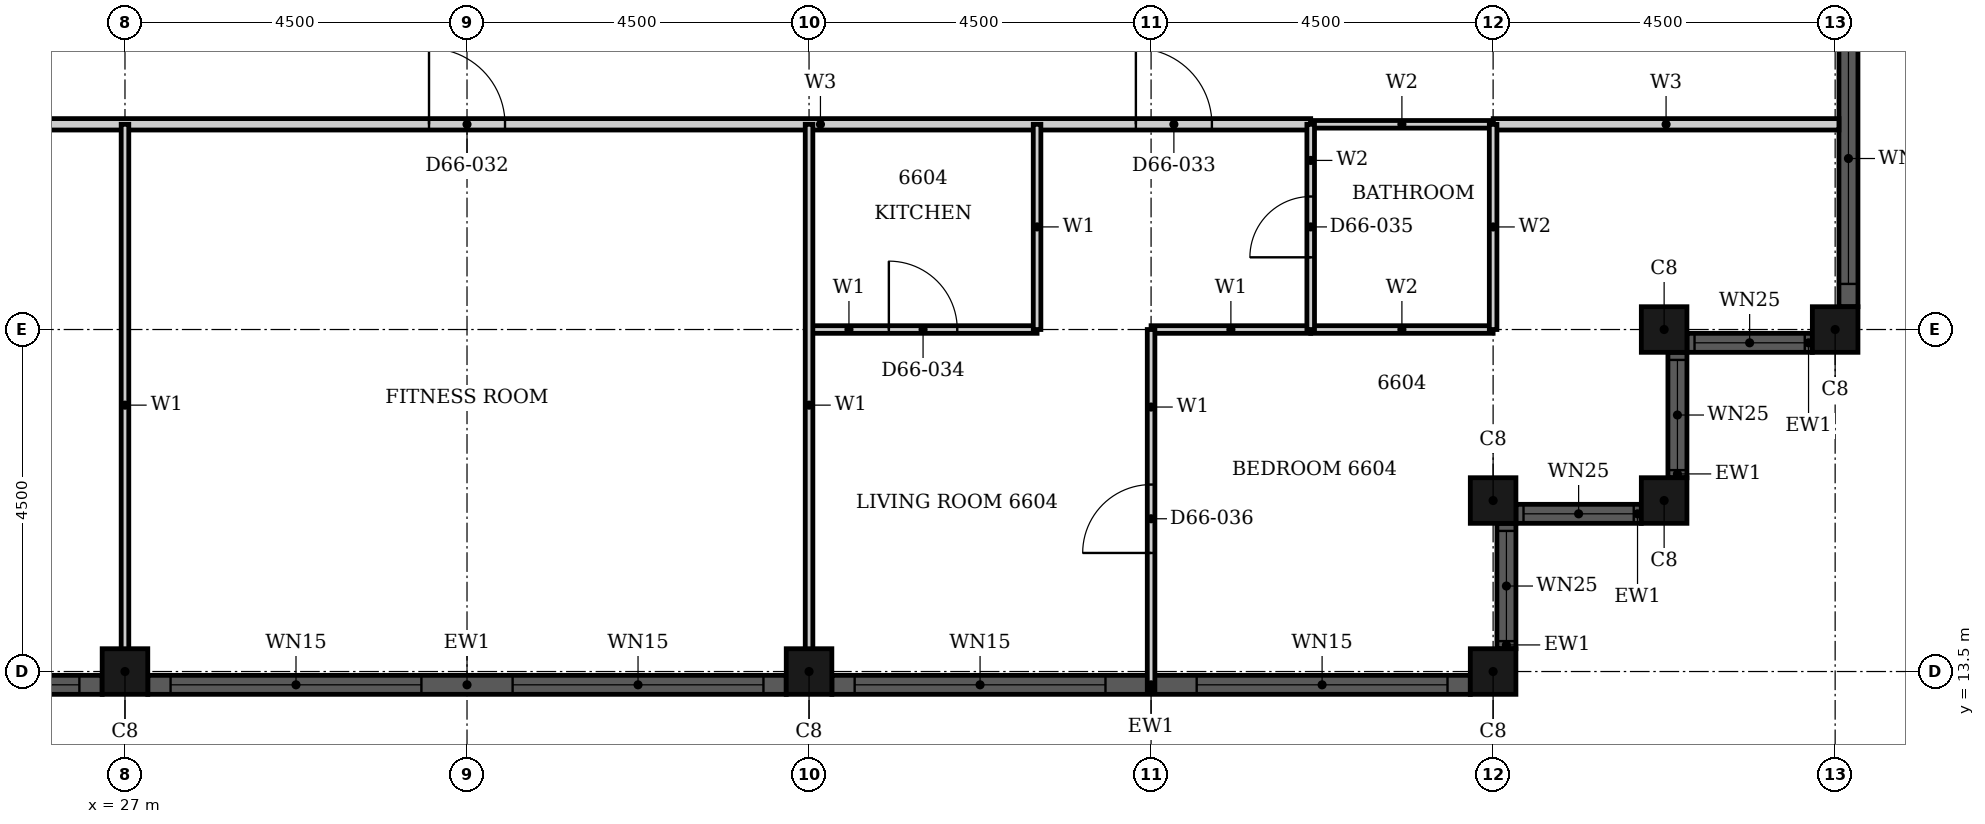
"""IFC4 building model, lengths in metres.
Left out: names, types, materials, properties, quantities, classifications, styles, units other than length and angle.
Written with IfcOpenShell. Run it as: python <this file> out.ifc"""

import sys

from ifc_helpers import new_model, si_unit, direction, frame, frame_2d, origin, origin_2d, place, context, subcontext, project, spatial, rectangle, hollow_rectangle, extrude, element, fill, save


model = new_model("IFC4")
c1 = context("Model", 3, precision=1e-05, world=origin(), true_north=direction((0.0, 1.0)))
c2 = subcontext(c1, "Body", "Model", "MODEL_VIEW")
j1 = project(units=[si_unit("LENGTHUNIT", "METRE"), si_unit("PLANEANGLEUNIT", "RADIAN")], contexts=[c1])
p1 = place(None, origin())
s1 = spatial("IfcSite", under=j1, at=p1, CompositionType="ELEMENT")
p2 = place(p1, origin())
s2 = spatial("IfcBuilding", under=s1, at=p2, CompositionType="ELEMENT")
p3 = place(p2, frame((0.0, 0.0, 260.1)))
s3 = spatial("IfcBuildingStorey", under=s2, at=p3, CompositionType="ELEMENT", Elevation=260.1)
for number, where, z_axis, x_axis in (
    (1, (27.0, 13.5, 0.0), (0.0, 0.0, 1.0), (1.0, 0.0, 0.0)),
    (2, (36.0, 13.5, 0.0), (0.0, 0.0, 1.0), (1.0, 0.0, 0.0)),
    (3, (45.0, 13.5, 0.0), (0.0, 0.0, 1.0), (1.0, 0.0, 0.0)),
    (4, (45.0, 15.75, 0.0), (0.0, 0.0, 1.0), (1.0, 0.0, 0.0)),
    (5, (47.25, 15.75, 0.0), (0.0, 0.0, 1.0), (1.0, 0.0, 0.0)),
    (6, (47.25, 18.0, 0.0), (0.0, 0.0, 1.0), (1.0, 0.0, 0.0)),
    (7, (49.5, 18.0, 0.0), (0.0, 0.0, 1.0), (1.0, 0.0, 0.0)),
):
    element("IfcColumn", number, at=place(p3, frame(where, z_axis=z_axis, x_axis=x_axis)), inside=s3, PredefinedType="COLUMN", context=c2, shape_type="SweptSolid", body=[
        extrude(hollow_rectangle(XDim=0.6, YDim=0.6, WallThickness=0.02, at=origin_2d()), origin(), (0.0, 0.0, 1.0), 3.7),
    ])
p4 = place(p3, frame((18.3, 13.325, 0.0), z_axis=(0.0, 0.0, 1.0), x_axis=(1.0, 0.0, 0.0)))
e8 = element("IfcWall", 8, at=p4, inside=s3, PredefinedType="SOLIDWALL", context=c2, shape_type="SweptSolid", body=[
    extrude(rectangle(XDim=8.4, YDim=0.25, at=frame_2d((4.2, 0.0))), origin(), (0.0, 0.0, 1.0), 3.7),
])
p5 = place(p4, frame((0.3, 0.0, 0.45)))
e9 = element("IfcOpeningElement", 9, at=p5, cuts=e8, PredefinedType="OPENING", context=c2, shape_type="SweptSolid", body=[
    extrude(rectangle(XDim=3.3, YDim=2.3, at=frame_2d((1.65, 1.15))), frame((0.0, 0.135, 0.0), z_axis=(0.0, -1.0, 0.0), x_axis=(1.0, 0.0, 0.0)), (0.0, 0.0, 1.0), 0.27),
])
p6 = place(p4, frame((4.8, 0.0, 0.45)))
e10 = element("IfcOpeningElement", 10, at=p6, cuts=e8, PredefinedType="OPENING", context=c2, shape_type="SweptSolid", body=[
    extrude(rectangle(XDim=3.3, YDim=2.3, at=frame_2d((1.65, 1.15))), frame((0.0, 0.135, 0.0), z_axis=(0.0, -1.0, 0.0), x_axis=(1.0, 0.0, 0.0)), (0.0, 0.0, 1.0), 0.27),
])
p7 = place(p3, frame((27.3, 13.325, 0.0), z_axis=(0.0, 0.0, 1.0), x_axis=(1.0, 0.0, 0.0)))
e11 = element("IfcWall", 11, at=p7, inside=s3, PredefinedType="SOLIDWALL", context=c2, shape_type="SweptSolid", body=[
    extrude(rectangle(XDim=8.4, YDim=0.25, at=frame_2d((4.2, 0.0))), origin(), (0.0, 0.0, 1.0), 3.7),
])
p8 = place(p7, frame((0.3, 0.0, 0.45)))
e12 = element("IfcOpeningElement", 12, at=p8, cuts=e11, PredefinedType="OPENING", context=c2, shape_type="SweptSolid", body=[
    extrude(rectangle(XDim=3.3, YDim=2.3, at=frame_2d((1.65, 1.15))), frame((0.0, 0.135, 0.0), z_axis=(0.0, -1.0, 0.0), x_axis=(1.0, 0.0, 0.0)), (0.0, 0.0, 1.0), 0.27),
])
p9 = place(p7, frame((4.8, 0.0, 0.45)))
e13 = element("IfcOpeningElement", 13, at=p9, cuts=e11, PredefinedType="OPENING", context=c2, shape_type="SweptSolid", body=[
    extrude(rectangle(XDim=3.3, YDim=2.3, at=frame_2d((1.65, 1.15))), frame((0.0, 0.135, 0.0), z_axis=(0.0, -1.0, 0.0), x_axis=(1.0, 0.0, 0.0)), (0.0, 0.0, 1.0), 0.27),
])
p10 = place(p3, frame((36.3, 13.325, 0.0), z_axis=(0.0, 0.0, 1.0), x_axis=(1.0, 0.0, 0.0)))
e14 = element("IfcWall", 14, at=p10, inside=s3, PredefinedType="SOLIDWALL", context=c2, shape_type="SweptSolid", body=[
    extrude(rectangle(XDim=8.4, YDim=0.25, at=frame_2d((4.2, 0.0))), origin(), (0.0, 0.0, 1.0), 3.7),
])
p11 = place(p10, frame((0.3, 0.0, 0.45)))
e15 = element("IfcOpeningElement", 15, at=p11, cuts=e14, PredefinedType="OPENING", context=c2, shape_type="SweptSolid", body=[
    extrude(rectangle(XDim=3.3, YDim=2.3, at=frame_2d((1.65, 1.15))), frame((0.0, 0.135, 0.0), z_axis=(0.0, -1.0, 0.0), x_axis=(1.0, 0.0, 0.0)), (0.0, 0.0, 1.0), 0.27),
])
p12 = place(p10, frame((4.8, 0.0, 0.45)))
e16 = element("IfcOpeningElement", 16, at=p12, cuts=e14, PredefinedType="OPENING", context=c2, shape_type="SweptSolid", body=[
    extrude(rectangle(XDim=3.3, YDim=2.3, at=frame_2d((1.65, 1.15))), frame((0.0, 0.135, 0.0), z_axis=(0.0, -1.0, 0.0), x_axis=(1.0, 0.0, 0.0)), (0.0, 0.0, 1.0), 0.27),
])
p13 = place(p3, frame((45.175, 13.8, 0.0), z_axis=(0.0, 0.0, 1.0), x_axis=(0.0, 1.0, 0.0)))
e17 = element("IfcWall", 17, at=p13, inside=s3, PredefinedType="SOLIDWALL", context=c2, shape_type="SweptSolid", body=[
    extrude(rectangle(XDim=1.65, YDim=0.25, at=frame_2d((0.825, 0.0))), origin(), (0.0, 0.0, 1.0), 3.7),
])
p14 = place(p13, frame((0.1, 0.0, 0.9)))
e18 = element("IfcOpeningElement", 18, at=p14, cuts=e17, PredefinedType="OPENING", context=c2, shape_type="SweptSolid", body=[
    extrude(rectangle(XDim=1.45, YDim=1.85, at=frame_2d((0.725, 0.925))), frame((0.0, 0.135, 0.0), z_axis=(0.0, -1.0, 0.0), x_axis=(1.0, 0.0, 0.0)), (0.0, 0.0, 1.0), 0.27),
])
p15 = place(p3, frame((45.3, 15.575, 0.0), z_axis=(0.0, 0.0, 1.0), x_axis=(1.0, 0.0, 0.0)))
e19 = element("IfcWall", 19, at=p15, inside=s3, PredefinedType="SOLIDWALL", context=c2, shape_type="SweptSolid", body=[
    extrude(rectangle(XDim=1.65, YDim=0.25, at=frame_2d((0.825, 0.0))), origin(), (0.0, 0.0, 1.0), 3.7),
])
p16 = place(p15, frame((0.1, 0.0, 0.9)))
e20 = element("IfcOpeningElement", 20, at=p16, cuts=e19, PredefinedType="OPENING", context=c2, shape_type="SweptSolid", body=[
    extrude(rectangle(XDim=1.45, YDim=1.85, at=frame_2d((0.725, 0.925))), frame((0.0, 0.135, 0.0), z_axis=(0.0, -1.0, 0.0), x_axis=(1.0, 0.0, 0.0)), (0.0, 0.0, 1.0), 0.27),
])
p17 = place(p3, frame((47.425, 16.05, 0.0), z_axis=(0.0, 0.0, 1.0), x_axis=(0.0, 1.0, 0.0)))
e21 = element("IfcWall", 21, at=p17, inside=s3, PredefinedType="SOLIDWALL", context=c2, shape_type="SweptSolid", body=[
    extrude(rectangle(XDim=1.65, YDim=0.25, at=frame_2d((0.825, 0.0))), origin(), (0.0, 0.0, 1.0), 3.7),
])
p18 = place(p17, frame((0.1, 0.0, 0.9)))
e22 = element("IfcOpeningElement", 22, at=p18, cuts=e21, PredefinedType="OPENING", context=c2, shape_type="SweptSolid", body=[
    extrude(rectangle(XDim=1.45, YDim=1.85, at=frame_2d((0.725, 0.925))), frame((0.0, 0.135, 0.0), z_axis=(0.0, -1.0, 0.0), x_axis=(1.0, 0.0, 0.0)), (0.0, 0.0, 1.0), 0.27),
])
p19 = place(p3, frame((47.55, 17.825, 0.0), z_axis=(0.0, 0.0, 1.0), x_axis=(1.0, 0.0, 0.0)))
e23 = element("IfcWall", 23, at=p19, inside=s3, PredefinedType="SOLIDWALL", context=c2, shape_type="SweptSolid", body=[
    extrude(rectangle(XDim=1.65, YDim=0.25, at=frame_2d((0.825, 0.0))), origin(), (0.0, 0.0, 1.0), 3.7),
])
p20 = place(p19, frame((0.1, 0.0, 0.9)))
e24 = element("IfcOpeningElement", 24, at=p20, cuts=e23, PredefinedType="OPENING", context=c2, shape_type="SweptSolid", body=[
    extrude(rectangle(XDim=1.45, YDim=1.85, at=frame_2d((0.725, 0.925))), frame((0.0, 0.135, 0.0), z_axis=(0.0, -1.0, 0.0), x_axis=(1.0, 0.0, 0.0)), (0.0, 0.0, 1.0), 0.27),
])
p21 = place(p3, frame((49.675, 18.3, 0.0), z_axis=(0.0, 0.0, 1.0), x_axis=(0.0, 1.0, 0.0)))
e25 = element("IfcWall", 25, at=p21, inside=s3, PredefinedType="SOLIDWALL", context=c2, shape_type="SweptSolid", body=[
    extrude(rectangle(XDim=8.4, YDim=0.25, at=frame_2d((4.2, 0.0))), origin(), (0.0, 0.0, 1.0), 3.7),
])
p22 = place(p21, frame((0.3, 0.0, 0.45)))
e26 = element("IfcOpeningElement", 26, at=p22, cuts=e25, PredefinedType="OPENING", context=c2, shape_type="SweptSolid", body=[
    extrude(rectangle(XDim=3.3, YDim=2.3, at=frame_2d((1.65, 1.15))), frame((0.0, 0.135, 0.0), z_axis=(0.0, -1.0, 0.0), x_axis=(1.0, 0.0, 0.0)), (0.0, 0.0, 1.0), 0.27),
])
p23 = place(p21, frame((4.8, 0.0, 0.45)))
e27 = element("IfcOpeningElement", 27, at=p23, cuts=e25, PredefinedType="OPENING", context=c2, shape_type="SweptSolid", body=[
    extrude(rectangle(XDim=3.3, YDim=2.3, at=frame_2d((1.65, 1.15))), frame((0.0, 0.135, 0.0), z_axis=(0.0, -1.0, 0.0), x_axis=(1.0, 0.0, 0.0)), (0.0, 0.0, 1.0), 0.27),
])
p24 = place(p3, frame((18.0, 20.7, 0.0), z_axis=(0.0, 0.0, 1.0), x_axis=(1.0, 0.0, 0.0)))
e28 = element("IfcWall", 28, at=p24, inside=s3, PredefinedType="PARTITIONING", context=c2, shape_type="SweptSolid", body=[
    extrude(rectangle(XDim=24.6, YDim=0.15, at=frame_2d((12.3, 0.0))), origin(), (0.0, 0.0, 1.0), 3.4),
])
p25 = place(p24, frame((4.0, 0.0, 0.0)))
e29 = element("IfcOpeningElement", 29, at=p25, cuts=e28, PredefinedType="OPENING", context=c2, shape_type="SweptSolid", body=[
    extrude(rectangle(XDim=1.0, YDim=2.1, at=frame_2d((0.5, 1.05))), frame((0.0, 0.085, 0.0), z_axis=(0.0, -1.0, 0.0), x_axis=(1.0, 0.0, 0.0)), (0.0, 0.0, 1.0), 0.17),
])
p26 = place(p24, frame((13.0, 0.0, 0.0)))
e30 = element("IfcOpeningElement", 30, at=p26, cuts=e28, PredefinedType="OPENING", context=c2, shape_type="SweptSolid", body=[
    extrude(rectangle(XDim=1.0, YDim=2.1, at=frame_2d((0.5, 1.05))), frame((0.0, 0.085, 0.0), z_axis=(0.0, -1.0, 0.0), x_axis=(1.0, 0.0, 0.0)), (0.0, 0.0, 1.0), 0.17),
])
p27 = place(p24, frame((22.3, 0.0, 0.0)))
e31 = element("IfcOpeningElement", 31, at=p27, cuts=e28, PredefinedType="OPENING", context=c2, shape_type="SweptSolid", body=[
    extrude(rectangle(XDim=1.0, YDim=2.2, at=frame_2d((0.5, 1.1))), frame((0.0, 0.085, 0.0), z_axis=(0.0, -1.0, 0.0), x_axis=(1.0, 0.0, 0.0)), (0.0, 0.0, 1.0), 0.17),
])
p28 = place(p3, frame((45.001, 20.7, 0.0), z_axis=(0.0, 0.0, 1.0), x_axis=(1.0, 0.0, 0.0)))
e32 = element("IfcWall", 32, at=p28, inside=s3, PredefinedType="PARTITIONING", context=c2, shape_type="SweptSolid", body=[
    extrude(rectangle(XDim=4.549, YDim=0.15, at=frame_2d((2.274, 0.0))), origin(), (0.0, 0.0, 1.0), 3.4),
])
p29 = place(p3, frame((40.5, 18.0, 0.0), z_axis=(0.0, 0.0, 1.0), x_axis=(1.0, 0.0, 0.0)))
e33 = element("IfcWall", 33, at=p29, inside=s3, PredefinedType="PARTITIONING", context=c2, shape_type="SweptSolid", body=[
    extrude(rectangle(XDim=2.1, YDim=0.1, at=frame_2d((1.05, 0.0))), origin(), (0.0, 0.0, 1.0), 3.4),
])
p30 = place(p3, frame((36.0, 18.0, 0.0), z_axis=(0.0, 0.0, 1.0), x_axis=(1.0, 0.0, 0.0)))
e34 = element("IfcWall", 34, at=p30, inside=s3, PredefinedType="PARTITIONING", context=c2, shape_type="SweptSolid", body=[
    extrude(rectangle(XDim=3.0, YDim=0.1, at=frame_2d((1.5, 0.0))), origin(), (0.0, 0.0, 1.0), 3.4),
])
p31 = place(p30, frame((1.05, 0.0, 0.0)))
e35 = element("IfcOpeningElement", 35, at=p31, cuts=e34, PredefinedType="OPENING", context=c2, shape_type="SweptSolid", body=[
    extrude(rectangle(XDim=0.9, YDim=2.1, at=frame_2d((0.45, 1.05))), frame((0.0, 0.06, 0.0), z_axis=(0.0, -1.0, 0.0), x_axis=(1.0, 0.0, 0.0)), (0.0, 0.0, 1.0), 0.12),
])
for number, where, z_axis, x_axis in (
    (36, (27.0, 13.31, 0.0), (0.0, 0.0, 1.0), (0.0, 1.0, 0.0)),
    (37, (36.0, 13.31, 0.0), (0.0, 0.0, 1.0), (0.0, 1.0, 0.0)),
):
    element("IfcWall", number, at=place(p3, frame(where, z_axis=z_axis, x_axis=x_axis)), inside=s3, PredefinedType="PARTITIONING", context=c2, shape_type="SweptSolid", body=[
        extrude(rectangle(XDim=7.39, YDim=0.1, at=frame_2d((3.695, 0.0))), origin(), (0.0, 0.0, 1.0), 3.4),
    ])
p32 = place(p3, frame((39.0, 18.0, 0.0), z_axis=(0.0, 0.0, 1.0), x_axis=(0.0, 1.0, 0.0)))
e38 = element("IfcWall", 38, at=p32, inside=s3, PredefinedType="PARTITIONING", context=c2, shape_type="SweptSolid", body=[
    extrude(rectangle(XDim=2.7, YDim=0.1, at=frame_2d((1.35, 0.0))), origin(), (0.0, 0.0, 1.0), 3.4),
])
p33 = place(p3, frame((40.5, 13.26, 0.0), z_axis=(0.0, 0.0, 1.0), x_axis=(0.0, 1.0, 0.0)))
e39 = element("IfcWall", 39, at=p33, inside=s3, PredefinedType="PARTITIONING", context=c2, shape_type="SweptSolid", body=[
    extrude(rectangle(XDim=4.74, YDim=0.1, at=frame_2d((2.37, 0.0))), origin(), (0.0, 0.0, 1.0), 3.4),
])
p34 = place(p33, frame((1.8, 0.0, 0.0)))
e40 = element("IfcOpeningElement", 40, at=p34, cuts=e39, PredefinedType="OPENING", context=c2, shape_type="SweptSolid", body=[
    extrude(rectangle(XDim=0.9, YDim=2.1, at=frame_2d((0.45, 1.05))), frame((0.0, 0.06, 0.0), z_axis=(0.0, -1.0, 0.0), x_axis=(1.0, 0.0, 0.0)), (0.0, 0.0, 1.0), 0.12),
])
for number, where, z_axis, x_axis in (
    (41, (42.6, 18.0, 0.0), (0.0, 0.0, 1.0), (1.0, 0.0, 0.0)),
    (42, (42.6, 20.7, 0.0), (0.0, 0.0, 1.0), (1.0, 0.0, 0.0)),
):
    element("IfcWall", number, at=place(p3, frame(where, z_axis=z_axis, x_axis=x_axis)), inside=s3, PredefinedType="PARTITIONING", context=c2, shape_type="SweptSolid", body=[
        extrude(rectangle(XDim=2.4, YDim=0.1, at=frame_2d((1.2, 0.0))), origin(), (0.0, 0.0, 1.0), 3.4),
    ])
p35 = place(p3, frame((42.6, 18.0, 0.0), z_axis=(0.0, 0.0, 1.0), x_axis=(0.0, 1.0, 0.0)))
e43 = element("IfcWall", 43, at=p35, inside=s3, PredefinedType="PARTITIONING", context=c2, shape_type="SweptSolid", body=[
    extrude(rectangle(XDim=2.7, YDim=0.1, at=frame_2d((1.35, 0.0))), origin(), (0.0, 0.0, 1.0), 3.4),
])
p36 = place(p35, frame((0.95, 0.0, 0.0)))
e44 = element("IfcOpeningElement", 44, at=p36, cuts=e43, PredefinedType="OPENING", context=c2, shape_type="SweptSolid", body=[
    extrude(rectangle(XDim=0.8, YDim=2.1, at=frame_2d((0.4, 1.05))), frame((0.0, 0.06, 0.0), z_axis=(0.0, -1.0, 0.0), x_axis=(1.0, 0.0, 0.0)), (0.0, 0.0, 1.0), 0.12),
])
p37 = place(p3, frame((45.0, 18.0, 0.0), z_axis=(0.0, 0.0, 1.0), x_axis=(0.0, 1.0, 0.0)))
e45 = element("IfcWall", 45, at=p37, inside=s3, PredefinedType="PARTITIONING", context=c2, shape_type="SweptSolid", body=[
    extrude(rectangle(XDim=2.699, YDim=0.1, at=frame_2d((1.35, 0.0))), origin(), (0.0, 0.0, 1.0), 3.4),
])
p38 = place(p6, origin())
e46 = element("IfcWindow", 46, at=p38, inside=s3, PartitioningType="SINGLE_PANEL", PredefinedType="WINDOW", context=c2, shape_type="SweptSolid", body=[
    extrude(rectangle(XDim=3.3, YDim=2.3, at=frame_2d((1.65, 1.15))), frame((0.0, 0.03, 0.0), z_axis=(0.0, -1.0, 0.0), x_axis=(1.0, 0.0, 0.0)), (0.0, 0.0, 1.0), 0.06),
])
fill(e10, e46)
p39 = place(p8, origin())
e47 = element("IfcWindow", 47, at=p39, inside=s3, PartitioningType="SINGLE_PANEL", PredefinedType="WINDOW", context=c2, shape_type="SweptSolid", body=[
    extrude(rectangle(XDim=3.3, YDim=2.3, at=frame_2d((1.65, 1.15))), frame((0.0, 0.03, 0.0), z_axis=(0.0, -1.0, 0.0), x_axis=(1.0, 0.0, 0.0)), (0.0, 0.0, 1.0), 0.06),
])
fill(e12, e47)
p40 = place(p9, origin())
e48 = element("IfcWindow", 48, at=p40, inside=s3, PartitioningType="SINGLE_PANEL", PredefinedType="WINDOW", context=c2, shape_type="SweptSolid", body=[
    extrude(rectangle(XDim=3.3, YDim=2.3, at=frame_2d((1.65, 1.15))), frame((0.0, 0.03, 0.0), z_axis=(0.0, -1.0, 0.0), x_axis=(1.0, 0.0, 0.0)), (0.0, 0.0, 1.0), 0.06),
])
fill(e13, e48)
p41 = place(p11, origin())
e49 = element("IfcWindow", 49, at=p41, inside=s3, PartitioningType="SINGLE_PANEL", PredefinedType="WINDOW", context=c2, shape_type="SweptSolid", body=[
    extrude(rectangle(XDim=3.3, YDim=2.3, at=frame_2d((1.65, 1.15))), frame((0.0, 0.03, 0.0), z_axis=(0.0, -1.0, 0.0), x_axis=(1.0, 0.0, 0.0)), (0.0, 0.0, 1.0), 0.06),
])
fill(e15, e49)
p42 = place(p12, origin())
e50 = element("IfcWindow", 50, at=p42, inside=s3, PartitioningType="SINGLE_PANEL", PredefinedType="WINDOW", context=c2, shape_type="SweptSolid", body=[
    extrude(rectangle(XDim=3.3, YDim=2.3, at=frame_2d((1.65, 1.15))), frame((0.0, 0.03, 0.0), z_axis=(0.0, -1.0, 0.0), x_axis=(1.0, 0.0, 0.0)), (0.0, 0.0, 1.0), 0.06),
])
fill(e16, e50)
p43 = place(p14, origin())
e51 = element("IfcWindow", 51, at=p43, inside=s3, PartitioningType="SINGLE_PANEL", PredefinedType="WINDOW", context=c2, shape_type="SweptSolid", body=[
    extrude(rectangle(XDim=1.45, YDim=1.85, at=frame_2d((0.725, 0.925))), frame((0.0, 0.03, 0.0), z_axis=(0.0, -1.0, 0.0), x_axis=(1.0, 0.0, 0.0)), (0.0, 0.0, 1.0), 0.06),
])
fill(e18, e51)
p44 = place(p16, origin())
e52 = element("IfcWindow", 52, at=p44, inside=s3, PartitioningType="SINGLE_PANEL", PredefinedType="WINDOW", context=c2, shape_type="SweptSolid", body=[
    extrude(rectangle(XDim=1.45, YDim=1.85, at=frame_2d((0.725, 0.925))), frame((0.0, 0.03, 0.0), z_axis=(0.0, -1.0, 0.0), x_axis=(1.0, 0.0, 0.0)), (0.0, 0.0, 1.0), 0.06),
])
fill(e20, e52)
p45 = place(p18, origin())
e53 = element("IfcWindow", 53, at=p45, inside=s3, PartitioningType="SINGLE_PANEL", PredefinedType="WINDOW", context=c2, shape_type="SweptSolid", body=[
    extrude(rectangle(XDim=1.45, YDim=1.85, at=frame_2d((0.725, 0.925))), frame((0.0, 0.03, 0.0), z_axis=(0.0, -1.0, 0.0), x_axis=(1.0, 0.0, 0.0)), (0.0, 0.0, 1.0), 0.06),
])
fill(e22, e53)
p46 = place(p20, origin())
e54 = element("IfcWindow", 54, at=p46, inside=s3, PartitioningType="SINGLE_PANEL", PredefinedType="WINDOW", context=c2, shape_type="SweptSolid", body=[
    extrude(rectangle(XDim=1.45, YDim=1.85, at=frame_2d((0.725, 0.925))), frame((0.0, 0.03, 0.0), z_axis=(0.0, -1.0, 0.0), x_axis=(1.0, 0.0, 0.0)), (0.0, 0.0, 1.0), 0.06),
])
fill(e24, e54)
p47 = place(p22, origin())
e55 = element("IfcWindow", 55, at=p47, inside=s3, PartitioningType="SINGLE_PANEL", PredefinedType="WINDOW", context=c2, shape_type="SweptSolid", body=[
    extrude(rectangle(XDim=3.3, YDim=2.3, at=frame_2d((1.65, 1.15))), frame((0.0, 0.03, 0.0), z_axis=(0.0, -1.0, 0.0), x_axis=(1.0, 0.0, 0.0)), (0.0, 0.0, 1.0), 0.06),
])
fill(e26, e55)
p48 = place(p26, origin())
e56 = element("IfcDoor", 56, at=p48, inside=s3, OperationType="SINGLE_SWING_LEFT", PredefinedType="DOOR", context=c2, shape_type="SweptSolid", body=[
    extrude(rectangle(XDim=1.0, YDim=2.1, at=frame_2d((0.5, 1.05))), frame((0.0, 0.025, 0.0), z_axis=(0.0, -1.0, 0.0), x_axis=(1.0, 0.0, 0.0)), (0.0, 0.0, 1.0), 0.05),
])
fill(e30, e56)
p49 = place(p27, origin())
e57 = element("IfcDoor", 57, at=p49, inside=s3, OperationType="SINGLE_SWING_LEFT", PredefinedType="DOOR", context=c2, shape_type="SweptSolid", body=[
    extrude(rectangle(XDim=1.0, YDim=2.2, at=frame_2d((0.5, 1.1))), frame((0.0, 0.025, 0.0), z_axis=(0.0, -1.0, 0.0), x_axis=(1.0, 0.0, 0.0)), (0.0, 0.0, 1.0), 0.05),
])
fill(e31, e57)
p50 = place(p31, origin())
e58 = element("IfcDoor", 58, at=p50, inside=s3, OperationType="SINGLE_SWING_RIGHT", PredefinedType="DOOR", context=c2, shape_type="SweptSolid", body=[
    extrude(rectangle(XDim=0.9, YDim=2.1, at=frame_2d((0.45, 1.05))), frame((0.0, 0.025, 0.0), z_axis=(0.0, -1.0, 0.0), x_axis=(1.0, 0.0, 0.0)), (0.0, 0.0, 1.0), 0.05),
])
fill(e35, e58)
p51 = place(p36, origin())
e59 = element("IfcDoor", 59, at=p51, inside=s3, OperationType="SINGLE_SWING_LEFT", PredefinedType="DOOR", context=c2, shape_type="SweptSolid", body=[
    extrude(rectangle(XDim=0.8, YDim=2.1, at=frame_2d((0.4, 1.05))), frame((0.0, 0.025, 0.0), z_axis=(0.0, -1.0, 0.0), x_axis=(1.0, 0.0, 0.0)), (0.0, 0.0, 1.0), 0.05),
])
fill(e44, e59)
p52 = place(p34, origin())
e60 = element("IfcDoor", 60, at=p52, inside=s3, OperationType="SINGLE_SWING_LEFT", PredefinedType="DOOR", context=c2, shape_type="SweptSolid", body=[
    extrude(rectangle(XDim=0.9, YDim=2.1, at=frame_2d((0.45, 1.05))), frame((0.0, 0.025, 0.0), z_axis=(0.0, -1.0, 0.0), x_axis=(1.0, 0.0, 0.0)), (0.0, 0.0, 1.0), 0.05),
])
fill(e40, e60)
save(model, sys.argv[1])
